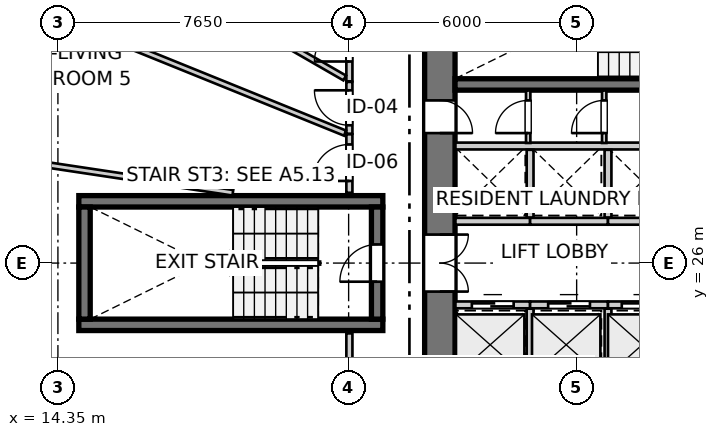
"""IFC4 building model, lengths in metres.
Left out: names, types, materials, properties, quantities, classifications, styles, units other than length and angle.
Written with IfcOpenShell. Run it as: python <this file> out.ifc"""

import sys

from ifc_helpers import new_model, si_unit, direction, frame, frame_2d, origin, place, context, subcontext, project, spatial, rectangle, extrude, source, transform, mapped, element, fill, save


model = new_model("IFC4")
c1 = context("Model", 3, precision=1e-05, world=origin(), true_north=direction((0.0, 1.0)))
c2 = subcontext(c1, "Body", "Model", "MODEL_VIEW")
j1 = project(units=[si_unit("LENGTHUNIT", "METRE"), si_unit("PLANEANGLEUNIT", "RADIAN")], contexts=[c1])
p1 = place(None, origin())
s1 = spatial("IfcSite", under=j1, at=p1, CompositionType="ELEMENT")
p2 = place(p1, origin())
s2 = spatial("IfcBuilding", under=s1, at=p2, CompositionType="ELEMENT")
p3 = place(p2, frame((0.0, 0.0, 27.0)))
s3 = spatial("IfcBuildingStorey", under=s2, at=p3, CompositionType="ELEMENT", Elevation=27.0)
p4 = place(p3, frame((24.4, 33.8, 0.0), z_axis=(0.0, 0.0, 1.0), x_axis=(0.0, -1.0, 0.0)))
e1 = element("IfcWall", 1, at=p4, inside=s3, PredefinedType="SHEAR", context=c2, shape_type="SweptSolid", body=[
    extrude(rectangle(XDim=15.6, YDim=0.8, at=frame_2d((7.8, 0.0))), origin(), (0.0, 0.0, 1.0), 2.935),
])
p5 = place(p4, frame((7.05, 0.0, 0.0)))
e2 = element("IfcOpeningElement", 2, at=p5, cuts=e1, PredefinedType="OPENING", context=c2, shape_type="SweptSolid", body=[
    extrude(rectangle(XDim=1.5, YDim=2.15, at=frame_2d((0.75, 1.075))), frame((0.0, 0.41, 0.0), z_axis=(0.0, -1.0, 0.0), x_axis=(1.0, 0.0, 0.0)), (0.0, 0.0, 1.0), 0.82),
])
p6 = place(p4, frame((3.52, 0.0, 0.0)))
e3 = element("IfcOpeningElement", 3, at=p6, cuts=e1, PredefinedType="OPENING", context=c2, shape_type="SweptSolid", body=[
    extrude(rectangle(XDim=0.86, YDim=2.05, at=frame_2d((0.43, 1.025))), frame((0.0, 0.41, 0.0), z_axis=(0.0, -1.0, 0.0), x_axis=(1.0, 0.0, 0.0)), (0.0, 0.0, 1.0), 0.82),
])
p7 = place(p4, frame((11.22, 0.0, 0.0)))
e4 = element("IfcOpeningElement", 4, at=p7, cuts=e1, PredefinedType="OPENING", context=c2, shape_type="SweptSolid", body=[
    extrude(rectangle(XDim=0.86, YDim=2.05, at=frame_2d((0.43, 1.025))), frame((0.0, 0.41, 0.0), z_axis=(0.0, -1.0, 0.0), x_axis=(1.0, 0.0, 0.0)), (0.0, 0.0, 1.0), 0.82),
])
p8 = place(p3, frame((24.8, 30.7, 0.0), z_axis=(0.0, 0.0, 1.0), x_axis=(1.0, 0.0, 0.0)))
e5 = element("IfcWall", 5, at=p8, inside=s3, PredefinedType="SHEAR", context=c2, shape_type="SweptSolid", body=[
    extrude(rectangle(XDim=11.1, YDim=0.3, at=frame_2d((5.55, 0.0))), origin(), (0.0, 0.0, 1.0), 2.935),
])
p9 = place(p8, frame((6.22, 0.0, 0.0)))
e6 = element("IfcOpeningElement", 6, at=p9, cuts=e5, PredefinedType="OPENING", context=c2, shape_type="SweptSolid", body=[
    extrude(rectangle(XDim=0.98, YDim=2.15, at=frame_2d((0.49, 1.075))), frame((0.0, 0.16, 0.0), z_axis=(0.0, -1.0, 0.0), x_axis=(1.0, 0.0, 0.0)), (0.0, 0.0, 1.0), 0.32),
])
p10 = place(p8, frame((9.15, 0.0, 0.0)))
e7 = element("IfcOpeningElement", 7, at=p10, cuts=e5, PredefinedType="OPENING", context=c2, shape_type="SweptSolid", body=[
    extrude(rectangle(XDim=1.15, YDim=2.15, at=frame_2d((0.575, 1.075))), frame((0.0, 0.16, 0.0), z_axis=(0.0, -1.0, 0.0), x_axis=(1.0, 0.0, 0.0)), (0.0, 0.0, 1.0), 0.32),
])
for number, where, z_axis, x_axis in (
    (8, (14.9, 24.375, 0.0), (0.0, 0.0, 1.0), (1.0, 0.0, 0.0)),
    (9, (22.9, 27.625, 0.0), (0.0, 0.0, 1.0), (-1.0, 0.0, 0.0)),
):
    element("IfcWall", number, at=place(p3, frame(where, z_axis=z_axis, x_axis=x_axis)), inside=s3, PredefinedType="SHEAR", context=c2, shape_type="SweptSolid", body=[
        extrude(rectangle(XDim=8.0, YDim=0.3, at=frame_2d((4.0, 0.0))), origin(), (0.0, 0.0, 1.0), 2.935),
    ])
p11 = place(p3, frame((15.05, 27.475, 0.0), z_axis=(0.0, 0.0, 1.0), x_axis=(0.0, -1.0, 0.0)))
e10 = element("IfcWall", 10, at=p11, inside=s3, PredefinedType="SHEAR", context=c2, shape_type="SweptSolid", body=[
    extrude(rectangle(XDim=2.95, YDim=0.3, at=frame_2d((1.475, 0.0))), origin(), (0.0, 0.0, 1.0), 2.935),
])
p12 = place(p3, frame((22.75, 24.525, 0.0), z_axis=(0.0, 0.0, 1.0), x_axis=(0.0, 1.0, 0.0)))
e11 = element("IfcWall", 11, at=p12, inside=s3, PredefinedType="SHEAR", context=c2, shape_type="SweptSolid", body=[
    extrude(rectangle(XDim=2.95, YDim=0.3, at=frame_2d((1.475, 0.0))), origin(), (0.0, 0.0, 1.0), 2.935),
])
p13 = place(p12, frame((0.985, 0.0, 0.0)))
e12 = element("IfcOpeningElement", 12, at=p13, cuts=e11, PredefinedType="OPENING", context=c2, shape_type="SweptSolid", body=[
    extrude(rectangle(XDim=0.98, YDim=2.15, at=frame_2d((0.49, 1.075))), frame((0.0, 0.16, 0.0), z_axis=(0.0, -1.0, 0.0), x_axis=(1.0, 0.0, 0.0)), (0.0, 0.0, 1.0), 0.32),
])
p14 = place(p3, frame((24.81, 24.9, 0.0), z_axis=(0.0, 0.0, 1.0), x_axis=(1.0, 0.0, 0.0)))
e13 = element("IfcWall", 13, at=p14, inside=s3, PredefinedType="PARTITIONING", context=c2, shape_type="SweptSolid", body=[
    extrude(rectangle(XDim=1.965, YDim=0.18, at=frame_2d((0.982, 0.0))), origin(), (0.0, 0.0, 1.0), 2.935),
])
p15 = place(p14, frame((0.433, 0.0, 0.0)))
e14 = element("IfcOpeningElement", 14, at=p15, cuts=e13, PredefinedType="OPENING", context=c2, shape_type="SweptSolid", body=[
    extrude(rectangle(XDim=1.1, YDim=2.15, at=frame_2d((0.55, 1.075))), frame((0.0, 0.1, 0.0), z_axis=(0.0, -1.0, 0.0), x_axis=(1.0, 0.0, 0.0)), (0.0, 0.0, 1.0), 0.2),
])
p16 = place(p3, frame((26.775, 24.9, 0.0), z_axis=(0.0, 0.0, 1.0), x_axis=(1.0, 0.0, 0.0)))
e15 = element("IfcWall", 15, at=p16, inside=s3, PredefinedType="PARTITIONING", context=c2, shape_type="SweptSolid", body=[
    extrude(rectangle(XDim=2.05, YDim=0.18, at=frame_2d((1.025, 0.0))), origin(), (0.0, 0.0, 1.0), 2.935),
])
p17 = place(p16, frame((0.475, 0.0, 0.0)))
e16 = element("IfcOpeningElement", 16, at=p17, cuts=e15, PredefinedType="OPENING", context=c2, shape_type="SweptSolid", body=[
    extrude(rectangle(XDim=1.1, YDim=2.15, at=frame_2d((0.55, 1.075))), frame((0.0, 0.1, 0.0), z_axis=(0.0, -1.0, 0.0), x_axis=(1.0, 0.0, 0.0)), (0.0, 0.0, 1.0), 0.2),
])
p18 = place(p3, frame((26.775, 23.02, 0.0), z_axis=(0.0, 0.0, 1.0), x_axis=(0.0, 1.0, 0.0)))
e17 = element("IfcWall", 17, at=p18, inside=s3, PredefinedType="PARTITIONING", context=c2, shape_type="SweptSolid", body=[
    extrude(rectangle(XDim=1.78, YDim=0.18, at=frame_2d((0.89, 0.0))), origin(), (0.0, 0.0, 1.0), 2.935),
])
p19 = place(p3, frame((28.825, 24.9, 0.0), z_axis=(0.0, 0.0, 1.0), x_axis=(1.0, 0.0, 0.0)))
e18 = element("IfcWall", 18, at=p19, inside=s3, PredefinedType="PARTITIONING", context=c2, shape_type="SweptSolid", body=[
    extrude(rectangle(XDim=1.825, YDim=0.18, at=frame_2d((0.913, 0.0))), origin(), (0.0, 0.0, 1.0), 2.935),
])
p20 = place(p19, frame((0.363, 0.0, 0.0)))
e19 = element("IfcOpeningElement", 19, at=p20, cuts=e18, PredefinedType="OPENING", context=c2, shape_type="SweptSolid", body=[
    extrude(rectangle(XDim=1.1, YDim=2.15, at=frame_2d((0.55, 1.075))), frame((0.0, 0.1, 0.0), z_axis=(0.0, -1.0, 0.0), x_axis=(1.0, 0.0, 0.0)), (0.0, 0.0, 1.0), 0.2),
])
p21 = place(p3, frame((28.825, 23.02, 0.0), z_axis=(0.0, 0.0, 1.0), x_axis=(0.0, 1.0, 0.0)))
e20 = element("IfcWall", 20, at=p21, inside=s3, PredefinedType="PARTITIONING", context=c2, shape_type="SweptSolid", body=[
    extrude(rectangle(XDim=1.78, YDim=0.18, at=frame_2d((0.89, 0.0))), origin(), (0.0, 0.0, 1.0), 2.935),
])
p22 = place(p3, frame((24.81, 29.08, 0.0), z_axis=(0.0, 0.0, 1.0), x_axis=(1.0, 0.0, 0.0)))
e21 = element("IfcWall", 21, at=p22, inside=s3, PredefinedType="PARTITIONING", context=c2, shape_type="SweptSolid", body=[
    extrude(rectangle(XDim=5.84, YDim=0.18, at=frame_2d((2.92, 0.0))), origin(), (0.0, 0.0, 1.0), 2.935),
])
p23 = place(p3, frame((24.81, 27.1, 0.0), z_axis=(0.0, 0.0, 1.0), x_axis=(1.0, 0.0, 0.0)))
e22 = element("IfcWall", 22, at=p23, inside=s3, PredefinedType="PARTITIONING", context=c2, shape_type="SweptSolid", body=[
    extrude(rectangle(XDim=1.965, YDim=0.18, at=frame_2d((0.982, 0.0))), origin(), (0.0, 0.0, 1.0), 2.935),
])
p24 = place(p3, frame((26.775, 27.1, 0.0), z_axis=(0.0, 0.0, 1.0), x_axis=(1.0, 0.0, 0.0)))
e23 = element("IfcWall", 23, at=p24, inside=s3, PredefinedType="PARTITIONING", context=c2, shape_type="SweptSolid", body=[
    extrude(rectangle(XDim=2.05, YDim=0.18, at=frame_2d((1.025, 0.0))), origin(), (0.0, 0.0, 1.0), 2.935),
])
p25 = place(p3, frame((26.775, 27.2, 0.0), z_axis=(0.0, 0.0, 1.0), x_axis=(0.0, 1.0, 0.0)))
e24 = element("IfcWall", 24, at=p25, inside=s3, PredefinedType="PARTITIONING", context=c2, shape_type="SweptSolid", body=[
    extrude(rectangle(XDim=1.78, YDim=0.18, at=frame_2d((0.89, 0.0))), origin(), (0.0, 0.0, 1.0), 2.935),
])
p26 = place(p3, frame((28.825, 27.1, 0.0), z_axis=(0.0, 0.0, 1.0), x_axis=(1.0, 0.0, 0.0)))
e25 = element("IfcWall", 25, at=p26, inside=s3, PredefinedType="PARTITIONING", context=c2, shape_type="SweptSolid", body=[
    extrude(rectangle(XDim=1.825, YDim=0.18, at=frame_2d((0.913, 0.0))), origin(), (0.0, 0.0, 1.0), 2.935),
])
p27 = place(p3, frame((28.825, 27.2, 0.0), z_axis=(0.0, 0.0, 1.0), x_axis=(0.0, 1.0, 0.0)))
e26 = element("IfcWall", 26, at=p27, inside=s3, PredefinedType="PARTITIONING", context=c2, shape_type="SweptSolid", body=[
    extrude(rectangle(XDim=1.78, YDim=0.18, at=frame_2d((0.89, 0.0))), origin(), (0.0, 0.0, 1.0), 2.935),
])
p28 = place(p3, frame((26.725, 29.16, 0.0), z_axis=(0.0, 0.0, 1.0), x_axis=(0.0, 1.0, 0.0)))
e27 = element("IfcWall", 27, at=p28, inside=s3, PredefinedType="PARTITIONING", context=c2, shape_type="SweptSolid", body=[
    extrude(rectangle(XDim=1.38, YDim=0.115, at=frame_2d((0.69, 0.0))), origin(), (0.0, 0.0, 1.0), 2.935),
])
p29 = place(p28, frame((0.26, 0.0, 0.0)))
e28 = element("IfcOpeningElement", 28, at=p29, cuts=e27, PredefinedType="OPENING", context=c2, shape_type="SweptSolid", body=[
    extrude(rectangle(XDim=0.86, YDim=2.05, at=frame_2d((0.43, 1.025))), frame((0.0, 0.067, 0.0), z_axis=(0.0, -1.0, 0.0), x_axis=(1.0, 0.0, 0.0)), (0.0, 0.0, 1.0), 0.135),
])
p30 = place(p3, frame((28.725, 29.16, 0.0), z_axis=(0.0, 0.0, 1.0), x_axis=(0.0, 1.0, 0.0)))
e29 = element("IfcWall", 29, at=p30, inside=s3, PredefinedType="PARTITIONING", context=c2, shape_type="SweptSolid", body=[
    extrude(rectangle(XDim=1.38, YDim=0.115, at=frame_2d((0.69, 0.0))), origin(), (0.0, 0.0, 1.0), 2.935),
])
p31 = place(p30, frame((0.26, 0.0, 0.0)))
e30 = element("IfcOpeningElement", 30, at=p31, cuts=e29, PredefinedType="OPENING", context=c2, shape_type="SweptSolid", body=[
    extrude(rectangle(XDim=0.86, YDim=2.05, at=frame_2d((0.43, 1.025))), frame((0.0, 0.067, 0.0), z_axis=(0.0, -1.0, 0.0), x_axis=(1.0, 0.0, 0.0)), (0.0, 0.0, 1.0), 0.135),
])
p32 = place(p3, frame((22.02, 16.883, 0.0), z_axis=(0.0, 0.0, 1.0), x_axis=(0.0, 1.0, 0.0)))
e31 = element("IfcWall", 31, at=p32, inside=s3, PredefinedType="PARTITIONING", context=c2, shape_type="SweptSolid", body=[
    extrude(rectangle(XDim=7.267, YDim=0.16, at=frame_2d((3.633, 0.0))), origin(), (0.0, 0.0, 1.0), 2.935),
])
p33 = place(p32, frame((2.845, 0.0, 0.0)))
e32 = element("IfcOpeningElement", 32, at=p33, cuts=e31, PredefinedType="OPENING", context=c2, shape_type="SweptSolid", body=[
    extrude(rectangle(XDim=1.3, YDim=2.1, at=frame_2d((0.65, 1.05))), frame((0.0, 0.09, 0.0), z_axis=(0.0, -1.0, 0.0), x_axis=(1.0, 0.0, 0.0)), (0.0, 0.0, 1.0), 0.18),
])
p34 = place(p3, frame((22.02, 30.782, 0.0), z_axis=(0.0, 0.0, 1.0), x_axis=(0.0, 1.0, 0.0)))
e33 = element("IfcWall", 33, at=p34, inside=s3, PredefinedType="PARTITIONING", context=c2, shape_type="SweptSolid", body=[
    extrude(rectangle(XDim=1.913, YDim=0.16, at=frame_2d((0.957, 0.0))), origin(), (0.0, 0.0, 1.0), 2.935),
])
p35 = place(p34, frame((0.522, 0.0, 0.0)))
e34 = element("IfcOpeningElement", 34, at=p35, cuts=e33, PredefinedType="OPENING", context=c2, shape_type="SweptSolid", body=[
    extrude(rectangle(XDim=0.92, YDim=2.1, at=frame_2d((0.46, 1.05))), frame((0.0, 0.09, 0.0), z_axis=(0.0, -1.0, 0.0), x_axis=(1.0, 0.0, 0.0)), (0.0, 0.0, 1.0), 0.18),
])
p36 = place(p3, frame((22.02, 27.85, 0.0), z_axis=(0.0, 0.0, 1.0), x_axis=(0.0, 1.0, 0.0)))
e35 = element("IfcWall", 35, at=p36, inside=s3, PredefinedType="PARTITIONING", context=c2, shape_type="SweptSolid", body=[
    extrude(rectangle(XDim=1.539, YDim=0.16, at=frame_2d((0.77, 0.0))), origin(), (0.0, 0.0, 1.0), 2.935),
])
p37 = place(p36, frame((0.311, 0.0, 0.0)))
e36 = element("IfcOpeningElement", 36, at=p37, cuts=e35, PredefinedType="OPENING", context=c2, shape_type="SweptSolid", body=[
    extrude(rectangle(XDim=0.96, YDim=2.1, at=frame_2d((0.48, 1.05))), frame((0.0, 0.09, 0.0), z_axis=(0.0, -1.0, 0.0), x_axis=(1.0, 0.0, 0.0)), (0.0, 0.0, 1.0), 0.18),
])
p38 = place(p3, frame((22.02, 29.404, 0.0), z_axis=(0.0, 0.0, 1.0), x_axis=(0.0, 1.0, 0.0)))
e37 = element("IfcWall", 37, at=p38, inside=s3, PredefinedType="PARTITIONING", context=c2, shape_type="SweptSolid", body=[
    extrude(rectangle(XDim=1.363, YDim=0.16, at=frame_2d((0.682, 0.0))), origin(), (0.0, 0.0, 1.0), 2.935),
])
p39 = place(p38, frame((0.222, 0.0, 0.0)))
e38 = element("IfcOpeningElement", 38, at=p39, cuts=e37, PredefinedType="OPENING", context=c2, shape_type="SweptSolid", body=[
    extrude(rectangle(XDim=0.92, YDim=2.1, at=frame_2d((0.46, 1.05))), frame((0.0, 0.09, 0.0), z_axis=(0.0, -1.0, 0.0), x_axis=(1.0, 0.0, 0.0)), (0.0, 0.0, 1.0), 0.18),
])
p40 = place(p3, frame((5.242, 29.91, 0.0), z_axis=(0.0, 0.0, 1.0), x_axis=(0.988899381561, -0.148586719285, 0.0)))
e39 = element("IfcWall", 39, at=p40, inside=s3, PredefinedType="PARTITIONING", context=c2, shape_type="SweptSolid", body=[
    extrude(rectangle(XDim=13.864, YDim=0.145, at=frame_2d((6.932, 0.0))), origin(), (0.0, 0.0, 1.0), 2.935),
])
p41 = place(p3, frame((9.577, 34.41, 0.0), z_axis=(0.0, 0.0, 1.0), x_axis=(0.926920362809, -0.375258099194, 0.0)))
e40 = element("IfcWall", 40, at=p41, inside=s3, PredefinedType="PARTITIONING", context=c2, shape_type="SweptSolid", body=[
    extrude(rectangle(XDim=13.3, YDim=0.145, at=frame_2d((6.65, 0.0))), origin(), (0.0, 0.0, 1.0), 2.935),
])
p42 = place(p3, frame((11.92, 36.618, 0.0), z_axis=(0.0, 0.0, 1.0), x_axis=(0.866473494239, -0.499223080177, 0.0)))
e41 = element("IfcWall", 41, at=p42, inside=s3, PredefinedType="PARTITIONING", context=c2, shape_type="SweptSolid", body=[
    extrude(rectangle(XDim=11.514, YDim=0.145, at=frame_2d((5.757, 0.0))), origin(), (0.0, 0.0, 1.0), 2.935),
])
m1 = source(origin(), c2, "Body", "SweptSolid", [
    extrude(rectangle(XDim=0.98, YDim=2.15, at=frame_2d((0.49, 1.075))), frame((0.0, 0.025, 0.0), z_axis=(0.0, -1.0, 0.0), x_axis=(1.0, 0.0, 0.0)), (0.0, 0.0, 1.0), 0.05),
])
p43 = place(p13, origin())
e42 = element("IfcDoor", 42, at=p43, inside=s3, OperationType="SINGLE_SWING_LEFT", PredefinedType="DOOR", context=c2, shape_type="MappedRepresentation", body=[
    mapped(m1, transform((0.0, 0.0, 0.0), x_axis=(1.0, 0.0, 0.0), y_axis=(0.0, 1.0, 0.0), z_axis=(0.0, 0.0, 1.0), scale=1.0)),
])
fill(e12, e42)
m2 = source(origin(), c2, "Body", "SweptSolid", [
    extrude(rectangle(XDim=1.5, YDim=2.15, at=frame_2d((0.75, 1.075))), frame((0.0, 0.025, 0.0), z_axis=(0.0, -1.0, 0.0), x_axis=(1.0, 0.0, 0.0)), (0.0, 0.0, 1.0), 0.05),
])
p44 = place(p5, origin())
e43 = element("IfcDoor", 43, at=p44, inside=s3, OperationType="DOUBLE_DOOR_SINGLE_SWING", PredefinedType="DOOR", context=c2, shape_type="MappedRepresentation", body=[
    mapped(m2, transform((0.0, 0.0, 0.0), x_axis=(1.0, 0.0, 0.0), y_axis=(0.0, 1.0, 0.0), z_axis=(0.0, 0.0, 1.0), scale=1.0)),
])
fill(e2, e43)
m3 = source(origin(), c2, "Body", "SweptSolid", [
    extrude(rectangle(XDim=0.86, YDim=2.05, at=frame_2d((0.43, 1.025))), frame((0.0, 0.025, 0.0), z_axis=(0.0, -1.0, 0.0), x_axis=(1.0, 0.0, 0.0)), (0.0, 0.0, 1.0), 0.05),
])
p45 = place(p6, origin())
e44 = element("IfcDoor", 44, at=p45, inside=s3, OperationType="SINGLE_SWING_RIGHT", PredefinedType="DOOR", context=c2, shape_type="MappedRepresentation", body=[
    mapped(m3, transform((0.0, 0.0, 0.0), x_axis=(1.0, 0.0, 0.0), y_axis=(0.0, 1.0, 0.0), z_axis=(0.0, 0.0, 1.0), scale=1.0)),
])
fill(e3, e44)
m4 = source(origin(), c2, "Body", "SweptSolid", [
    extrude(rectangle(XDim=1.1, YDim=2.15, at=frame_2d((0.55, 1.075))), frame((0.0, 0.025, 0.0), z_axis=(0.0, -1.0, 0.0), x_axis=(1.0, 0.0, 0.0)), (0.0, 0.0, 1.0), 0.05),
])
p46 = place(p15, origin())
e45 = element("IfcDoor", 45, at=p46, inside=s3, OperationType="DOUBLE_DOOR_SLIDING", PredefinedType="DOOR", context=c2, shape_type="MappedRepresentation", body=[
    mapped(m4, transform((0.0, 0.0, 0.0), x_axis=(1.0, 0.0, 0.0), y_axis=(0.0, 1.0, 0.0), z_axis=(0.0, 0.0, 1.0), scale=1.0)),
])
fill(e14, e45)
p47 = place(p17, origin())
e46 = element("IfcDoor", 46, at=p47, inside=s3, OperationType="DOUBLE_DOOR_SLIDING", PredefinedType="DOOR", context=c2, shape_type="MappedRepresentation", body=[
    mapped(m4, transform((0.0, 0.0, 0.0), x_axis=(1.0, 0.0, 0.0), y_axis=(0.0, 1.0, 0.0), z_axis=(0.0, 0.0, 1.0), scale=1.0)),
])
fill(e16, e46)
p48 = place(p20, origin())
e47 = element("IfcDoor", 47, at=p48, inside=s3, OperationType="DOUBLE_DOOR_SLIDING", PredefinedType="DOOR", context=c2, shape_type="MappedRepresentation", body=[
    mapped(m4, transform((0.0, 0.0, 0.0), x_axis=(1.0, 0.0, 0.0), y_axis=(0.0, 1.0, 0.0), z_axis=(0.0, 0.0, 1.0), scale=1.0)),
])
fill(e19, e47)
p49 = place(p29, origin())
e48 = element("IfcDoor", 48, at=p49, inside=s3, OperationType="SINGLE_SWING_LEFT", PredefinedType="DOOR", context=c2, shape_type="MappedRepresentation", body=[
    mapped(m3, transform((0.0, 0.0, 0.0), x_axis=(1.0, 0.0, 0.0), y_axis=(0.0, 1.0, 0.0), z_axis=(0.0, 0.0, 1.0), scale=1.0)),
])
fill(e28, e48)
p50 = place(p31, origin())
e49 = element("IfcDoor", 49, at=p50, inside=s3, OperationType="SINGLE_SWING_LEFT", PredefinedType="DOOR", context=c2, shape_type="MappedRepresentation", body=[
    mapped(m3, transform((0.0, 0.0, 0.0), x_axis=(1.0, 0.0, 0.0), y_axis=(0.0, 1.0, 0.0), z_axis=(0.0, 0.0, 1.0), scale=1.0)),
])
fill(e30, e49)
m5 = source(origin(), c2, "Body", "SweptSolid", [
    extrude(rectangle(XDim=0.92, YDim=2.1, at=frame_2d((0.46, 1.05))), frame((0.0, 0.025, 0.0), z_axis=(0.0, -1.0, 0.0), x_axis=(1.0, 0.0, 0.0)), (0.0, 0.0, 1.0), 0.05),
])
p51 = place(p35, origin())
e50 = element("IfcDoor", 50, at=p51, inside=s3, OperationType="SINGLE_SWING_LEFT", PredefinedType="DOOR", context=c2, shape_type="MappedRepresentation", body=[
    mapped(m5, transform((0.0, 0.0, 0.0), x_axis=(1.0, 0.0, 0.0), y_axis=(0.0, 1.0, 0.0), z_axis=(0.0, 0.0, 1.0), scale=1.0)),
])
fill(e34, e50)
m6 = source(origin(), c2, "Body", "SweptSolid", [
    extrude(rectangle(XDim=0.96, YDim=2.1, at=frame_2d((0.48, 1.05))), frame((0.0, 0.025, 0.0), z_axis=(0.0, -1.0, 0.0), x_axis=(1.0, 0.0, 0.0)), (0.0, 0.0, 1.0), 0.05),
])
p52 = place(p37, origin())
e51 = element("IfcDoor", 51, at=p52, inside=s3, OperationType="SINGLE_SWING_LEFT", PredefinedType="DOOR", context=c2, shape_type="MappedRepresentation", body=[
    mapped(m6, transform((0.0, 0.0, 0.0), x_axis=(1.0, 0.0, 0.0), y_axis=(0.0, 1.0, 0.0), z_axis=(0.0, 0.0, 1.0), scale=1.0)),
])
fill(e36, e51)
p53 = place(p39, origin())
e52 = element("IfcDoor", 52, at=p53, inside=s3, OperationType="SINGLE_SWING_RIGHT", PredefinedType="DOOR", context=c2, shape_type="MappedRepresentation", body=[
    mapped(m5, transform((0.0, 0.0, 0.0), x_axis=(1.0, 0.0, 0.0), y_axis=(0.0, 1.0, 0.0), z_axis=(0.0, 0.0, 1.0), scale=1.0)),
])
fill(e38, e52)
save(model, sys.argv[1])
